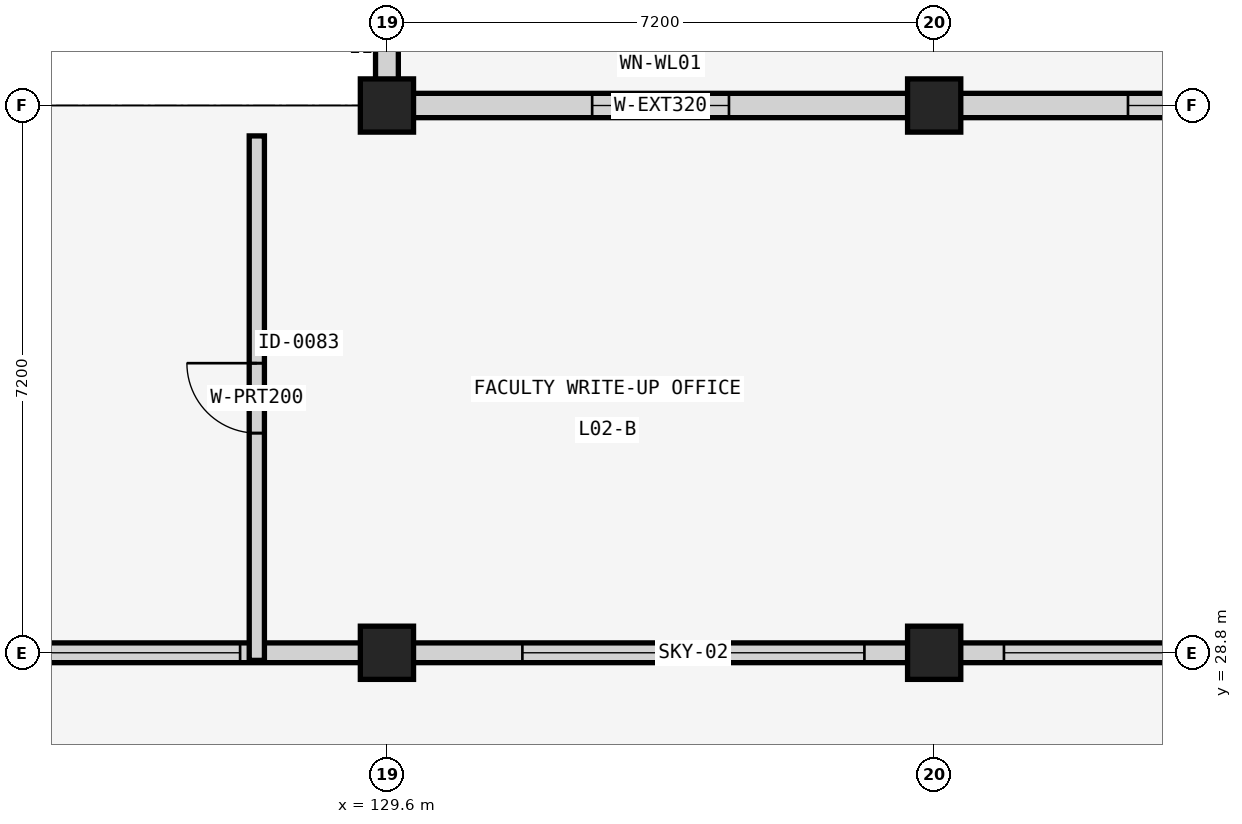
"""IFC4 building model, lengths in metres.
Left out: names, types, materials, properties, quantities, classifications, styles, units other than length and angle.
Written with IfcOpenShell. Run it as: python <this file> out.ifc"""

import sys

from ifc_helpers import new_model, si_unit, direction, frame, frame_2d, origin, origin_2d, place, context, subcontext, project, spatial, rectangle, extrude, element, fill, save


model = new_model("IFC4")
c1 = context("Model", 3, precision=1e-05, world=origin(), true_north=direction((0.0, 1.0)))
c2 = subcontext(c1, "Body", "Model", "MODEL_VIEW")
j1 = project(units=[si_unit("LENGTHUNIT", "METRE"), si_unit("PLANEANGLEUNIT", "RADIAN")], contexts=[c1])
p1 = place(None, origin())
s1 = spatial("IfcSite", under=j1, at=p1, CompositionType="ELEMENT")
p2 = place(p1, origin())
s2 = spatial("IfcBuilding", under=s1, at=p2, CompositionType="ELEMENT")
p3 = place(p2, frame((0.0, 0.0, 8.96)))
s3 = spatial("IfcBuildingStorey", under=s2, at=p3, CompositionType="ELEMENT", Elevation=8.96)
for number, where, z_axis, x_axis in (
    (1, (129.6, 28.8, 0.0), (0.0, 0.0, 1.0), (1.0, 0.0, 0.0)),
    (2, (129.6, 36.0, 0.0), (0.0, 0.0, 1.0), (1.0, 0.0, 0.0)),
    (3, (136.8, 28.8, 0.0), (0.0, 0.0, 1.0), (1.0, 0.0, 0.0)),
    (4, (136.8, 36.0, 0.0), (0.0, 0.0, 1.0), (1.0, 0.0, 0.0)),
):
    element("IfcColumn", number, at=place(p3, frame(where, z_axis=z_axis, x_axis=x_axis)), inside=s3, PredefinedType="COLUMN", context=c2, shape_type="SweptSolid", body=[
        extrude(rectangle(XDim=0.7, YDim=0.7, at=origin_2d()), origin(), (0.0, 0.0, 1.0), 4.16),
    ])
p4 = place(p3, frame((129.6, 36.34, 0.0), z_axis=(0.0, 0.0, 1.0), x_axis=(0.0, 1.0, 0.0)))
e5 = element("IfcWall", 5, at=p4, inside=s3, PredefinedType="SOLIDWALL", context=c2, shape_type="SweptSolid", body=[
    extrude(rectangle(XDim=6.52, YDim=0.3, at=frame_2d((3.26, 0.0))), origin(), (0.0, 0.0, 1.0), 3.21),
])
p5 = place(p4, frame((1.61, 0.0, 0.95)))
e6 = element("IfcOpeningElement", 6, at=p5, cuts=e5, PredefinedType="OPENING", context=c2, shape_type="SweptSolid", body=[
    extrude(rectangle(XDim=3.3, YDim=1.8, at=frame_2d((1.65, 0.9))), frame((0.0, 0.16, 0.0), z_axis=(0.0, -1.0, 0.0), x_axis=(1.0, 0.0, 0.0)), (0.0, 0.0, 1.0), 0.32),
])
p6 = place(p3, frame((129.94, 36.0, 0.0), z_axis=(0.0, 0.0, 1.0), x_axis=(1.0, 0.0, 0.0)))
e7 = element("IfcWall", 7, at=p6, inside=s3, PredefinedType="SOLIDWALL", context=c2, shape_type="SweptSolid", body=[
    extrude(rectangle(XDim=6.52, YDim=0.32, at=frame_2d((3.26, 0.0))), origin(), (0.0, 0.0, 1.0), 3.21),
])
p7 = place(p6, frame((2.36, 0.0, 0.95)))
e8 = element("IfcOpeningElement", 8, at=p7, cuts=e7, PredefinedType="OPENING", context=c2, shape_type="SweptSolid", body=[
    extrude(rectangle(XDim=1.8, YDim=2.1, at=frame_2d((0.9, 1.05))), frame((0.0, 0.17, 0.0), z_axis=(0.0, -1.0, 0.0), x_axis=(1.0, 0.0, 0.0)), (0.0, 0.0, 1.0), 0.34),
])
p8 = place(p3, frame((137.14, 36.0, 0.0), z_axis=(0.0, 0.0, 1.0), x_axis=(1.0, 0.0, 0.0)))
e9 = element("IfcWall", 9, at=p8, inside=s3, PredefinedType="SOLIDWALL", context=c2, shape_type="SweptSolid", body=[
    extrude(rectangle(XDim=6.52, YDim=0.32, at=frame_2d((3.26, 0.0))), origin(), (0.0, 0.0, 1.0), 3.21),
])
p9 = place(p8, frame((2.21, 0.0, 0.95)))
e10 = element("IfcOpeningElement", 10, at=p9, cuts=e9, PredefinedType="OPENING", context=c2, shape_type="SweptSolid", body=[
    extrude(rectangle(XDim=2.1, YDim=2.1, at=frame_2d((1.05, 1.05))), frame((0.0, 0.17, 0.0), z_axis=(0.0, -1.0, 0.0), x_axis=(1.0, 0.0, 0.0)), (0.0, 0.0, 1.0), 0.34),
])
p10 = place(p3, frame((115.2, 28.8, 4.16), z_axis=(0.0, 0.0, 1.0), x_axis=(1.0, 0.0, 0.0)))
e11 = element("IfcWall", 11, at=p10, inside=s3, PredefinedType="SOLIDWALL", context=c2, shape_type="SweptSolid", body=[
    extrude(rectangle(XDim=14.4, YDim=0.26, at=frame_2d((7.2, 0.0))), origin(), (0.0, 0.0, 1.0), 3.95),
])
p11 = place(p10, frame((1.932, 0.0, 0.4)))
e12 = element("IfcOpeningElement", 12, at=p11, cuts=e11, PredefinedType="OPENING", context=c2, shape_type="SweptSolid", body=[
    extrude(rectangle(XDim=4.2, YDim=2.6, at=frame_2d((2.1, 1.3))), frame((0.0, 0.14, 0.0), z_axis=(0.0, -1.0, 0.0), x_axis=(1.0, 0.0, 0.0)), (0.0, 0.0, 1.0), 0.28),
])
p12 = place(p10, frame((8.268, 0.0, 0.4)))
e13 = element("IfcOpeningElement", 13, at=p12, cuts=e11, PredefinedType="OPENING", context=c2, shape_type="SweptSolid", body=[
    extrude(rectangle(XDim=4.2, YDim=2.6, at=frame_2d((2.1, 1.3))), frame((0.0, 0.14, 0.0), z_axis=(0.0, -1.0, 0.0), x_axis=(1.0, 0.0, 0.0)), (0.0, 0.0, 1.0), 0.28),
])
p13 = place(p3, frame((129.6, 28.8, 4.16), z_axis=(0.0, 0.0, 1.0), x_axis=(1.0, 0.0, 0.0)))
e14 = element("IfcWall", 14, at=p13, inside=s3, PredefinedType="SOLIDWALL", context=c2, shape_type="SweptSolid", body=[
    extrude(rectangle(XDim=14.4, YDim=0.26, at=frame_2d((7.2, 0.0))), origin(), (0.0, 0.0, 1.0), 3.95),
])
p14 = place(p13, frame((1.782, 0.0, 0.4)))
e15 = element("IfcOpeningElement", 15, at=p14, cuts=e14, PredefinedType="OPENING", context=c2, shape_type="SweptSolid", body=[
    extrude(rectangle(XDim=4.5, YDim=2.6, at=frame_2d((2.25, 1.3))), frame((0.0, 0.14, 0.0), z_axis=(0.0, -1.0, 0.0), x_axis=(1.0, 0.0, 0.0)), (0.0, 0.0, 1.0), 0.28),
])
p15 = place(p13, frame((8.118, 0.0, 0.4)))
e16 = element("IfcOpeningElement", 16, at=p15, cuts=e14, PredefinedType="OPENING", context=c2, shape_type="SweptSolid", body=[
    extrude(rectangle(XDim=4.5, YDim=2.6, at=frame_2d((2.25, 1.3))), frame((0.0, 0.14, 0.0), z_axis=(0.0, -1.0, 0.0), x_axis=(1.0, 0.0, 0.0)), (0.0, 0.0, 1.0), 0.28),
])
p16 = place(p3, frame((127.888, 28.7, 0.0), z_axis=(0.0, 0.0, 1.0), x_axis=(0.0, 1.0, 0.0)))
e17 = element("IfcWall", 17, at=p16, inside=s3, PredefinedType="PARTITIONING", context=c2, shape_type="SweptSolid", body=[
    extrude(rectangle(XDim=6.9, YDim=0.2, at=frame_2d((3.45, 0.0))), origin(), (0.0, 0.0, 1.0), 3.81),
])
p17 = place(p16, frame((2.99, 0.0, 0.0)))
e18 = element("IfcOpeningElement", 18, at=p17, cuts=e17, PredefinedType="OPENING", context=c2, shape_type="SweptSolid", body=[
    extrude(rectangle(XDim=0.92, YDim=2.15, at=frame_2d((0.46, 1.075))), frame((0.0, 0.11, 0.0), z_axis=(0.0, -1.0, 0.0), x_axis=(1.0, 0.0, 0.0)), (0.0, 0.0, 1.0), 0.22),
])
p18 = place(p7, origin())
e19 = element("IfcWindow", 19, at=p18, inside=s3, PartitioningType="SINGLE_PANEL", PredefinedType="WINDOW", context=c2, shape_type="SweptSolid", body=[
    extrude(rectangle(XDim=1.8, YDim=2.1, at=frame_2d((0.9, 1.05))), frame((0.0, 0.03, 0.0), z_axis=(0.0, -1.0, 0.0), x_axis=(1.0, 0.0, 0.0)), (0.0, 0.0, 1.0), 0.06),
])
fill(e8, e19)
p19 = place(p9, origin())
e20 = element("IfcWindow", 20, at=p19, inside=s3, PartitioningType="SINGLE_PANEL", PredefinedType="WINDOW", context=c2, shape_type="SweptSolid", body=[
    extrude(rectangle(XDim=2.1, YDim=2.1, at=frame_2d((1.05, 1.05))), frame((0.0, 0.03, 0.0), z_axis=(0.0, -1.0, 0.0), x_axis=(1.0, 0.0, 0.0)), (0.0, 0.0, 1.0), 0.06),
])
fill(e10, e20)
p20 = place(p12, origin())
e21 = element("IfcWindow", 21, at=p20, inside=s3, PartitioningType="SINGLE_PANEL", PredefinedType="SKYLIGHT", context=c2, shape_type="SweptSolid", body=[
    extrude(rectangle(XDim=4.2, YDim=2.6, at=frame_2d((2.1, 1.3))), frame((0.0, 0.03, 0.0), z_axis=(0.0, -1.0, 0.0), x_axis=(1.0, 0.0, 0.0)), (0.0, 0.0, 1.0), 0.06),
])
fill(e13, e21)
p21 = place(p14, origin())
e22 = element("IfcWindow", 22, at=p21, inside=s3, PartitioningType="SINGLE_PANEL", PredefinedType="SKYLIGHT", context=c2, shape_type="SweptSolid", body=[
    extrude(rectangle(XDim=4.5, YDim=2.6, at=frame_2d((2.25, 1.3))), frame((0.0, 0.03, 0.0), z_axis=(0.0, -1.0, 0.0), x_axis=(1.0, 0.0, 0.0)), (0.0, 0.0, 1.0), 0.06),
])
fill(e15, e22)
p22 = place(p15, origin())
e23 = element("IfcWindow", 23, at=p22, inside=s3, PartitioningType="SINGLE_PANEL", PredefinedType="SKYLIGHT", context=c2, shape_type="SweptSolid", body=[
    extrude(rectangle(XDim=4.5, YDim=2.6, at=frame_2d((2.25, 1.3))), frame((0.0, 0.03, 0.0), z_axis=(0.0, -1.0, 0.0), x_axis=(1.0, 0.0, 0.0)), (0.0, 0.0, 1.0), 0.06),
])
fill(e16, e23)
p23 = place(p17, origin())
e24 = element("IfcDoor", 24, at=p23, inside=s3, OperationType="SINGLE_SWING_RIGHT", PredefinedType="DOOR", context=c2, shape_type="SweptSolid", body=[
    extrude(rectangle(XDim=0.92, YDim=2.15, at=frame_2d((0.46, 1.075))), frame((0.0, 0.025, 0.0), z_axis=(0.0, -1.0, 0.0), x_axis=(1.0, 0.0, 0.0)), (0.0, 0.0, 1.0), 0.05),
])
fill(e18, e24)
save(model, sys.argv[1])
